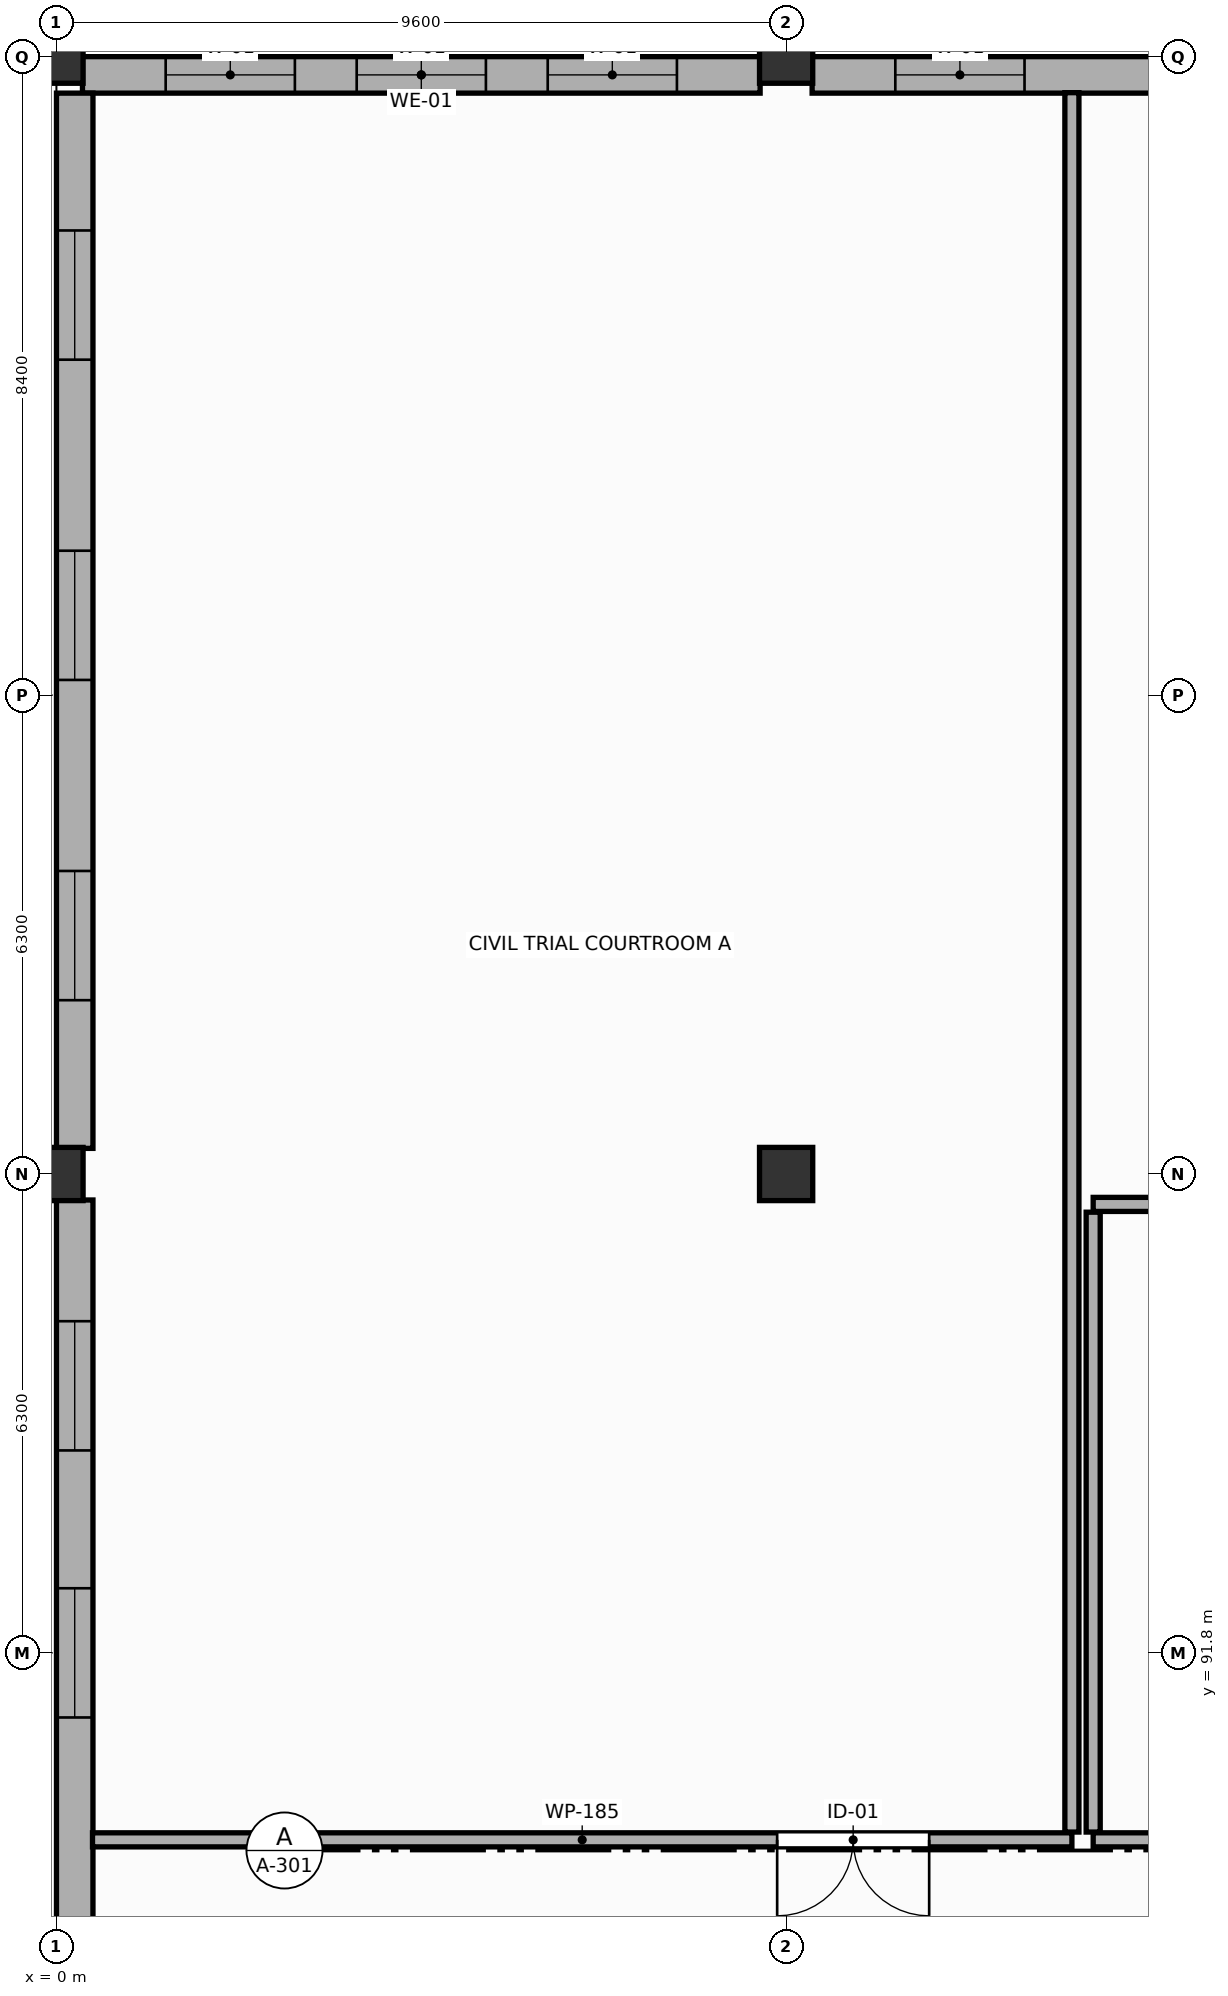
"""IFC4 building model, lengths in metres.
Left out: names, types, materials, properties, quantities, classifications, styles, units other than length and angle.
Written with IfcOpenShell. Run it as: python <this file> out.ifc"""

import sys

from ifc_helpers import new_model, si_unit, direction, frame, frame_2d, origin, origin_2d, place, context, subcontext, project, spatial, rectangle, extrude, element, fill, save


model = new_model("IFC4")
c1 = context("Model", 3, precision=1e-05, world=origin(), true_north=direction((0.0, 1.0)))
c2 = subcontext(c1, "Body", "Model", "MODEL_VIEW")
j1 = project(units=[si_unit("LENGTHUNIT", "METRE"), si_unit("PLANEANGLEUNIT", "RADIAN")], contexts=[c1])
p1 = place(None, origin())
s1 = spatial("IfcSite", under=j1, at=p1, CompositionType="ELEMENT")
p2 = place(p1, origin())
s2 = spatial("IfcBuilding", under=s1, at=p2, CompositionType="ELEMENT")
p3 = place(p2, frame((0.0, 0.0, 5.4)))
s3 = spatial("IfcBuildingStorey", under=s2, at=p3, CompositionType="ELEMENT", Elevation=5.4)
for number, where, z_axis, x_axis in (
    (1, (0.0, 98.1, 0.0), (0.0, 0.0, 1.0), (1.0, 0.0, 0.0)),
    (2, (0.0, 112.8, 0.0), (0.0, 0.0, 1.0), (1.0, 0.0, 0.0)),
    (3, (9.6, 98.1, 0.0), (0.0, 0.0, 1.0), (1.0, 0.0, 0.0)),
    (4, (9.6, 112.8, 0.0), (0.0, 0.0, 1.0), (1.0, 0.0, 0.0)),
):
    element("IfcColumn", number, at=place(p3, frame(where, z_axis=z_axis, x_axis=x_axis)), inside=s3, PredefinedType="COLUMN", context=c2, shape_type="SweptSolid", body=[
        extrude(rectangle(XDim=0.7, YDim=0.7, at=origin_2d()), origin(), (0.0, 0.0, 1.0), 4.5),
    ])
p4 = place(p3, frame((0.342, 112.56, 0.0), z_axis=(0.0, 0.0, 1.0), x_axis=(1.0, 0.0, 0.0)))
e5 = element("IfcWall", 5, at=p4, inside=s3, PredefinedType="STANDARD", context=c2, shape_type="SweptSolid", body=[
    extrude(rectangle(XDim=8.916, YDim=0.48, at=frame_2d((4.458, 0.0))), origin(), (0.0, 0.0, 1.0), 3.28),
])
p5 = place(p4, frame((1.095, 0.0, 0.76)))
e6 = element("IfcOpeningElement", 6, at=p5, cuts=e5, PredefinedType="OPENING", context=c2, shape_type="SweptSolid", body=[
    extrude(rectangle(XDim=1.7, YDim=2.3, at=frame_2d((0.85, 1.15))), frame((0.0, 0.25, 0.0), z_axis=(0.0, -1.0, 0.0), x_axis=(1.0, 0.0, 0.0)), (0.0, 0.0, 1.0), 0.5),
])
p6 = place(p4, frame((3.608, 0.0, 0.76)))
e7 = element("IfcOpeningElement", 7, at=p6, cuts=e5, PredefinedType="OPENING", context=c2, shape_type="SweptSolid", body=[
    extrude(rectangle(XDim=1.7, YDim=2.3, at=frame_2d((0.85, 1.15))), frame((0.0, 0.25, 0.0), z_axis=(0.0, -1.0, 0.0), x_axis=(1.0, 0.0, 0.0)), (0.0, 0.0, 1.0), 0.5),
])
p7 = place(p4, frame((6.121, 0.0, 0.76)))
e8 = element("IfcOpeningElement", 8, at=p7, cuts=e5, PredefinedType="OPENING", context=c2, shape_type="SweptSolid", body=[
    extrude(rectangle(XDim=1.7, YDim=2.3, at=frame_2d((0.85, 1.15))), frame((0.0, 0.25, 0.0), z_axis=(0.0, -1.0, 0.0), x_axis=(1.0, 0.0, 0.0)), (0.0, 0.0, 1.0), 0.5),
])
p8 = place(p3, frame((9.942, 112.56, 0.0), z_axis=(0.0, 0.0, 1.0), x_axis=(1.0, 0.0, 0.0)))
e9 = element("IfcWall", 9, at=p8, inside=s3, PredefinedType="STANDARD", context=c2, shape_type="SweptSolid", body=[
    extrude(rectangle(XDim=8.916, YDim=0.48, at=frame_2d((4.458, 0.0))), origin(), (0.0, 0.0, 1.0), 3.28),
])
p9 = place(p8, frame((1.095, 0.0, 0.76)))
e10 = element("IfcOpeningElement", 10, at=p9, cuts=e9, PredefinedType="OPENING", context=c2, shape_type="SweptSolid", body=[
    extrude(rectangle(XDim=1.7, YDim=2.3, at=frame_2d((0.85, 1.15))), frame((0.0, 0.25, 0.0), z_axis=(0.0, -1.0, 0.0), x_axis=(1.0, 0.0, 0.0)), (0.0, 0.0, 1.0), 0.5),
])
p10 = place(p8, frame((6.121, 0.0, 0.76)))
e11 = element("IfcOpeningElement", 11, at=p10, cuts=e9, PredefinedType="OPENING", context=c2, shape_type="SweptSolid", body=[
    extrude(rectangle(XDim=1.7, YDim=2.3, at=frame_2d((0.85, 1.15))), frame((0.0, 0.25, 0.0), z_axis=(0.0, -1.0, 0.0), x_axis=(1.0, 0.0, 0.0)), (0.0, 0.0, 1.0), 0.5),
])
p11 = place(p3, frame((0.24, 85.837, 0.0), z_axis=(0.0, 0.0, 1.0), x_axis=(0.0, 1.0, 0.0)))
e12 = element("IfcWall", 12, at=p11, inside=s3, PredefinedType="STANDARD", context=c2, shape_type="SweptSolid", body=[
    extrude(rectangle(XDim=11.921, YDim=0.48, at=frame_2d((5.96, 0.0))), origin(), (0.0, 0.0, 1.0), 3.28),
])
p12 = place(p11, frame((5.113, 0.0, 0.76)))
e13 = element("IfcOpeningElement", 13, at=p12, cuts=e12, PredefinedType="OPENING", context=c2, shape_type="SweptSolid", body=[
    extrude(rectangle(XDim=1.7, YDim=2.3, at=frame_2d((0.85, 1.15))), frame((0.0, 0.25, 0.0), z_axis=(0.0, -1.0, 0.0), x_axis=(1.0, 0.0, 0.0)), (0.0, 0.0, 1.0), 0.5),
])
p13 = place(p11, frame((8.626, 0.0, 0.76)))
e14 = element("IfcOpeningElement", 14, at=p13, cuts=e12, PredefinedType="OPENING", context=c2, shape_type="SweptSolid", body=[
    extrude(rectangle(XDim=1.7, YDim=2.3, at=frame_2d((0.85, 1.15))), frame((0.0, 0.25, 0.0), z_axis=(0.0, -1.0, 0.0), x_axis=(1.0, 0.0, 0.0)), (0.0, 0.0, 1.0), 0.5),
])
p14 = place(p3, frame((0.24, 98.437, 0.0), z_axis=(0.0, 0.0, 1.0), x_axis=(0.0, 1.0, 0.0)))
e15 = element("IfcWall", 15, at=p14, inside=s3, PredefinedType="STANDARD", context=c2, shape_type="SweptSolid", body=[
    extrude(rectangle(XDim=13.883, YDim=0.48, at=frame_2d((6.941, 0.0))), origin(), (0.0, 0.0, 1.0), 3.28),
])
p15 = place(p14, frame((1.95, 0.0, 0.76)))
e16 = element("IfcOpeningElement", 16, at=p15, cuts=e15, PredefinedType="OPENING", context=c2, shape_type="SweptSolid", body=[
    extrude(rectangle(XDim=1.7, YDim=2.3, at=frame_2d((0.85, 1.15))), frame((0.0, 0.25, 0.0), z_axis=(0.0, -1.0, 0.0), x_axis=(1.0, 0.0, 0.0)), (0.0, 0.0, 1.0), 0.5),
])
p16 = place(p14, frame((6.163, 0.0, 0.76)))
e17 = element("IfcOpeningElement", 17, at=p16, cuts=e15, PredefinedType="OPENING", context=c2, shape_type="SweptSolid", body=[
    extrude(rectangle(XDim=1.7, YDim=2.3, at=frame_2d((0.85, 1.15))), frame((0.0, 0.25, 0.0), z_axis=(0.0, -1.0, 0.0), x_axis=(1.0, 0.0, 0.0)), (0.0, 0.0, 1.0), 0.5),
])
p17 = place(p14, frame((10.376, 0.0, 0.76)))
e18 = element("IfcOpeningElement", 18, at=p17, cuts=e15, PredefinedType="OPENING", context=c2, shape_type="SweptSolid", body=[
    extrude(rectangle(XDim=1.7, YDim=2.3, at=frame_2d((0.85, 1.15))), frame((0.0, 0.25, 0.0), z_axis=(0.0, -1.0, 0.0), x_axis=(1.0, 0.0, 0.0)), (0.0, 0.0, 1.0), 0.5),
])
p18 = place(p3, frame((13.36, 89.34, 0.0), z_axis=(0.0, 0.0, 1.0), x_axis=(-1.0, 0.0, 0.0)))
e19 = element("IfcWall", 19, at=p18, inside=s3, PredefinedType="PARTITIONING", context=c2, shape_type="SweptSolid", body=[
    extrude(rectangle(XDim=12.886, YDim=0.185, at=frame_2d((6.443, 0.0))), origin(), (0.0, 0.0, 1.0), 3.33),
])
p19 = place(p18, frame((1.878, 0.0, 0.0)))
e20 = element("IfcOpeningElement", 20, at=p19, cuts=e19, PredefinedType="OPENING", context=c2, shape_type="SweptSolid", body=[
    extrude(rectangle(XDim=2.0, YDim=2.5, at=frame_2d((1.0, 1.25))), frame((0.0, 0.103, 0.0), z_axis=(0.0, -1.0, 0.0), x_axis=(1.0, 0.0, 0.0)), (0.0, 0.0, 1.0), 0.205),
])
p20 = place(p3, frame((13.36, 112.326, 0.0), z_axis=(0.0, 0.0, 1.0), x_axis=(0.0, -1.0, 0.0)))
e21 = element("IfcWall", 21, at=p20, inside=s3, PredefinedType="PARTITIONING", context=c2, shape_type="SweptSolid", body=[
    extrude(rectangle(XDim=22.884, YDim=0.185, at=frame_2d((11.442, 0.0))), origin(), (0.0, 0.0, 1.0), 3.43),
])
p21 = place(p3, frame((13.64, 97.7, 0.0), z_axis=(0.0, 0.0, 1.0), x_axis=(1.0, 0.0, 0.0)))
e22 = element("IfcWall", 22, at=p21, inside=s3, PredefinedType="PARTITIONING", context=c2, shape_type="SweptSolid", body=[
    extrude(rectangle(XDim=12.42, YDim=0.185, at=frame_2d((6.21, 0.0))), origin(), (0.0, 0.0, 1.0), 3.28),
])
p22 = place(p3, frame((26.06, 89.34, 0.0), z_axis=(0.0, 0.0, 1.0), x_axis=(-1.0, 0.0, 0.0)))
e23 = element("IfcWall", 23, at=p22, inside=s3, PredefinedType="PARTITIONING", context=c2, shape_type="SweptSolid", body=[
    extrude(rectangle(XDim=12.42, YDim=0.185, at=frame_2d((6.21, 0.0))), origin(), (0.0, 0.0, 1.0), 3.33),
])
p23 = place(p22, frame((1.808, 0.0, 0.0)))
e24 = element("IfcOpeningElement", 24, at=p23, cuts=e23, PredefinedType="OPENING", context=c2, shape_type="SweptSolid", body=[
    extrude(rectangle(XDim=2.0, YDim=2.5, at=frame_2d((1.0, 1.25))), frame((0.0, 0.103, 0.0), z_axis=(0.0, -1.0, 0.0), x_axis=(1.0, 0.0, 0.0)), (0.0, 0.0, 1.0), 0.205),
])
p24 = place(p3, frame((13.64, 89.442, 0.0), z_axis=(0.0, 0.0, 1.0), x_axis=(0.0, 1.0, 0.0)))
e25 = element("IfcWall", 25, at=p24, inside=s3, PredefinedType="PARTITIONING", context=c2, shape_type="SweptSolid", body=[
    extrude(rectangle(XDim=8.155, YDim=0.185, at=frame_2d((4.078, 0.0))), origin(), (0.0, 0.0, 1.0), 3.58),
])
p25 = place(p5, origin())
e26 = element("IfcWindow", 26, at=p25, inside=s3, PartitioningType="SINGLE_PANEL", PredefinedType="WINDOW", context=c2, shape_type="SweptSolid", body=[
    extrude(rectangle(XDim=1.7, YDim=2.3, at=frame_2d((0.85, 1.15))), frame((0.0, 0.03, 0.0), z_axis=(0.0, -1.0, 0.0), x_axis=(1.0, 0.0, 0.0)), (0.0, 0.0, 1.0), 0.06),
])
fill(e6, e26)
p26 = place(p6, origin())
e27 = element("IfcWindow", 27, at=p26, inside=s3, PartitioningType="SINGLE_PANEL", PredefinedType="WINDOW", context=c2, shape_type="SweptSolid", body=[
    extrude(rectangle(XDim=1.7, YDim=2.3, at=frame_2d((0.85, 1.15))), frame((0.0, 0.03, 0.0), z_axis=(0.0, -1.0, 0.0), x_axis=(1.0, 0.0, 0.0)), (0.0, 0.0, 1.0), 0.06),
])
fill(e7, e27)
p27 = place(p7, origin())
e28 = element("IfcWindow", 28, at=p27, inside=s3, PartitioningType="SINGLE_PANEL", PredefinedType="WINDOW", context=c2, shape_type="SweptSolid", body=[
    extrude(rectangle(XDim=1.7, YDim=2.3, at=frame_2d((0.85, 1.15))), frame((0.0, 0.03, 0.0), z_axis=(0.0, -1.0, 0.0), x_axis=(1.0, 0.0, 0.0)), (0.0, 0.0, 1.0), 0.06),
])
fill(e8, e28)
p28 = place(p9, origin())
e29 = element("IfcWindow", 29, at=p28, inside=s3, PartitioningType="SINGLE_PANEL", PredefinedType="WINDOW", context=c2, shape_type="SweptSolid", body=[
    extrude(rectangle(XDim=1.7, YDim=2.3, at=frame_2d((0.85, 1.15))), frame((0.0, 0.03, 0.0), z_axis=(0.0, -1.0, 0.0), x_axis=(1.0, 0.0, 0.0)), (0.0, 0.0, 1.0), 0.06),
])
fill(e10, e29)
p29 = place(p12, origin())
e30 = element("IfcWindow", 30, at=p29, inside=s3, PartitioningType="SINGLE_PANEL", PredefinedType="WINDOW", context=c2, shape_type="SweptSolid", body=[
    extrude(rectangle(XDim=1.7, YDim=2.3, at=frame_2d((0.85, 1.15))), frame((0.0, 0.03, 0.0), z_axis=(0.0, -1.0, 0.0), x_axis=(1.0, 0.0, 0.0)), (0.0, 0.0, 1.0), 0.06),
])
fill(e13, e30)
p30 = place(p13, origin())
e31 = element("IfcWindow", 31, at=p30, inside=s3, PartitioningType="SINGLE_PANEL", PredefinedType="WINDOW", context=c2, shape_type="SweptSolid", body=[
    extrude(rectangle(XDim=1.7, YDim=2.3, at=frame_2d((0.85, 1.15))), frame((0.0, 0.03, 0.0), z_axis=(0.0, -1.0, 0.0), x_axis=(1.0, 0.0, 0.0)), (0.0, 0.0, 1.0), 0.06),
])
fill(e14, e31)
p31 = place(p15, origin())
e32 = element("IfcWindow", 32, at=p31, inside=s3, PartitioningType="SINGLE_PANEL", PredefinedType="WINDOW", context=c2, shape_type="SweptSolid", body=[
    extrude(rectangle(XDim=1.7, YDim=2.3, at=frame_2d((0.85, 1.15))), frame((0.0, 0.03, 0.0), z_axis=(0.0, -1.0, 0.0), x_axis=(1.0, 0.0, 0.0)), (0.0, 0.0, 1.0), 0.06),
])
fill(e16, e32)
p32 = place(p16, origin())
e33 = element("IfcWindow", 33, at=p32, inside=s3, PartitioningType="SINGLE_PANEL", PredefinedType="WINDOW", context=c2, shape_type="SweptSolid", body=[
    extrude(rectangle(XDim=1.7, YDim=2.3, at=frame_2d((0.85, 1.15))), frame((0.0, 0.03, 0.0), z_axis=(0.0, -1.0, 0.0), x_axis=(1.0, 0.0, 0.0)), (0.0, 0.0, 1.0), 0.06),
])
fill(e17, e33)
p33 = place(p17, origin())
e34 = element("IfcWindow", 34, at=p33, inside=s3, PartitioningType="SINGLE_PANEL", PredefinedType="WINDOW", context=c2, shape_type="SweptSolid", body=[
    extrude(rectangle(XDim=1.7, YDim=2.3, at=frame_2d((0.85, 1.15))), frame((0.0, 0.03, 0.0), z_axis=(0.0, -1.0, 0.0), x_axis=(1.0, 0.0, 0.0)), (0.0, 0.0, 1.0), 0.06),
])
fill(e18, e34)
p34 = place(p19, origin())
e35 = element("IfcDoor", 35, at=p34, inside=s3, OperationType="DOUBLE_DOOR_SINGLE_SWING", PredefinedType="DOOR", context=c2, shape_type="SweptSolid", body=[
    extrude(rectangle(XDim=2.0, YDim=2.5, at=frame_2d((1.0, 1.25))), frame((0.0, 0.025, 0.0), z_axis=(0.0, -1.0, 0.0), x_axis=(1.0, 0.0, 0.0)), (0.0, 0.0, 1.0), 0.05),
])
fill(e20, e35)
save(model, sys.argv[1])
